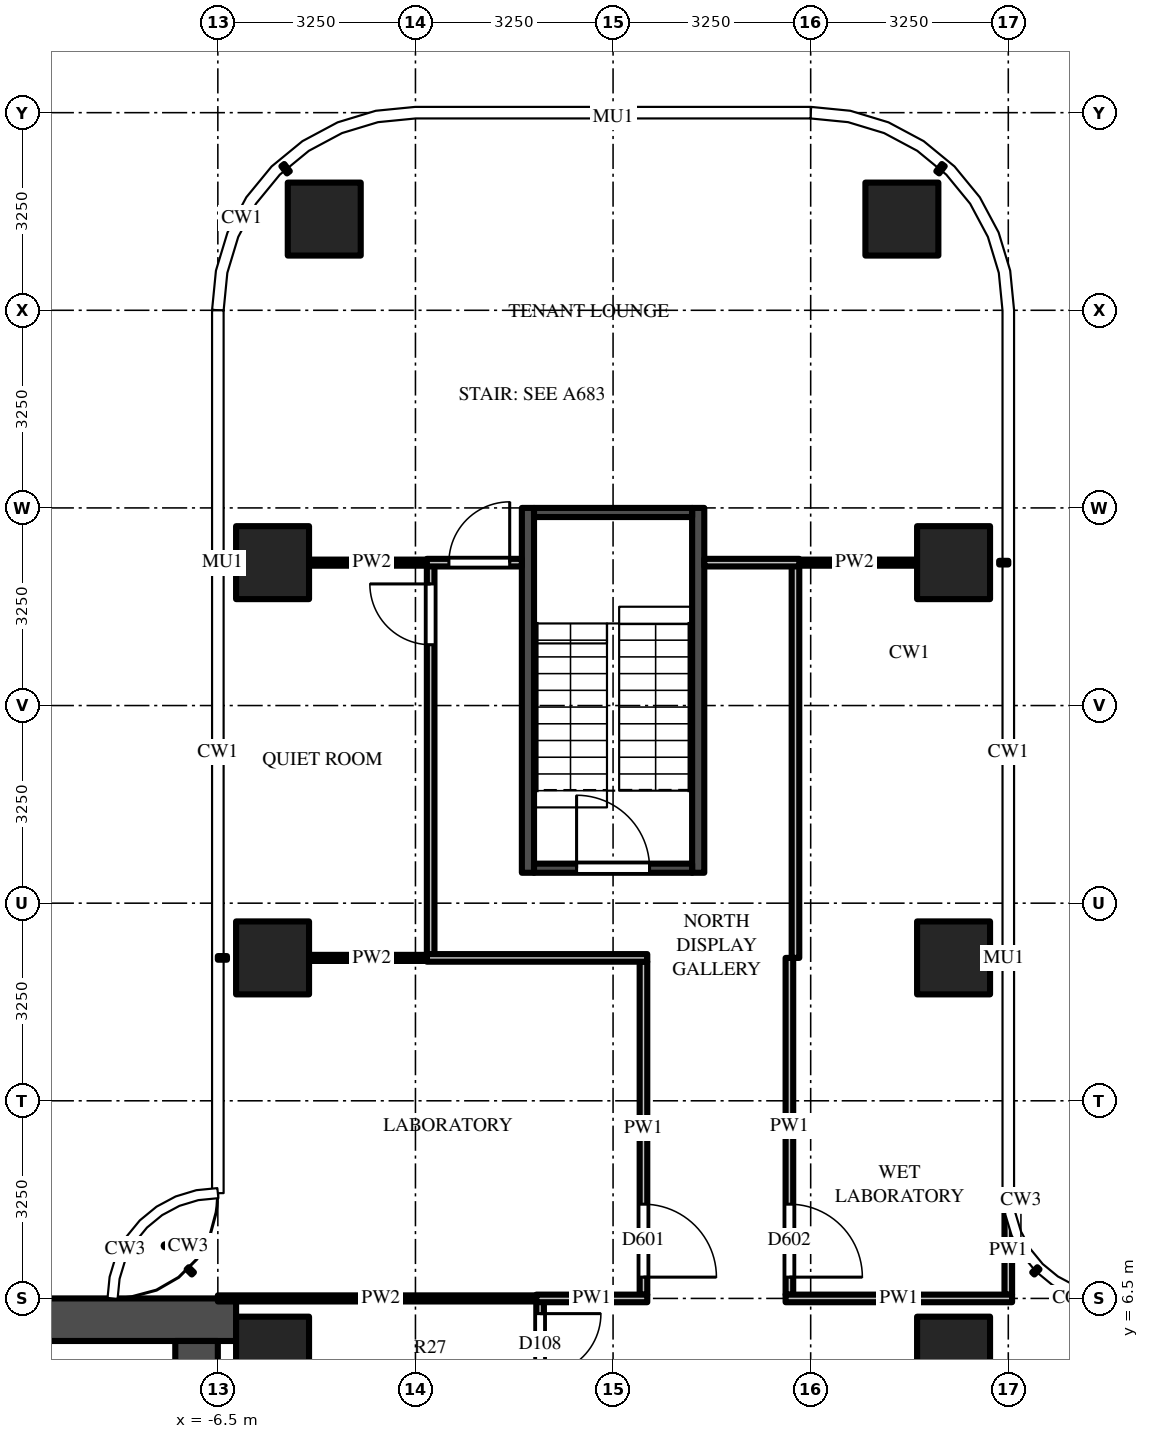
"""IFC4 building model, lengths in metres.
Left out: names, types, materials, properties, quantities, classifications, styles, units other than length and angle.
Written with IfcOpenShell. Run it as: python <this file> out.ifc"""

import sys

from ifc_helpers import new_model, si_unit, direction, frame, frame_2d, origin, origin_2d, place, context, subcontext, project, spatial, rectangle, extrude, source, transform, mapped, element, fill, save


model = new_model("IFC4")
c1 = context("Model", 3, precision=1e-05, world=origin(), true_north=direction((0.0, 1.0)))
c2 = subcontext(c1, "Body", "Model", "MODEL_VIEW")
j1 = project(units=[si_unit("LENGTHUNIT", "METRE"), si_unit("PLANEANGLEUNIT", "RADIAN")], contexts=[c1])
p1 = place(None, origin())
s1 = spatial("IfcSite", under=j1, at=p1, CompositionType="ELEMENT")
p2 = place(p1, origin())
s2 = spatial("IfcBuilding", under=s1, at=p2, CompositionType="ELEMENT")
p3 = place(p2, frame((0.0, 0.0, 162.0)))
s3 = spatial("IfcBuildingStorey", under=s2, at=p3, CompositionType="ELEMENT", Elevation=162.0)
m1 = source(origin(), c2, "Body", "SweptSolid", [
    extrude(rectangle(XDim=1.2, YDim=1.2, at=origin_2d()), origin(), (0.0, 0.0, 1.0), 3.9),
])
for number, where, z_axis, x_axis in (
    (1, (-5.6, 12.1, 0.0), (0.0, 0.0, 1.0), (1.0, 0.0, 0.0)),
    (2, (-5.6, 18.6, 0.0), (0.0, 0.0, 1.0), (1.0, 0.0, 0.0)),
    (3, (-4.75, 24.25, 0.0), (0.0, 0.0, 1.0), (1.0, 0.0, 0.0)),
    (4, (5.6, 12.1, 0.0), (0.0, 0.0, 1.0), (1.0, 0.0, 0.0)),
    (5, (5.6, 18.6, 0.0), (0.0, 0.0, 1.0), (1.0, 0.0, 0.0)),
    (6, (4.75, 24.25, 0.0), (0.0, 0.0, 1.0), (1.0, 0.0, 0.0)),
    (7, (5.6, 5.6, 0.0), (0.0, 0.0, 1.0), (1.0, 0.0, 0.0)),
    (8, (-5.6, 5.6, 0.0), (0.0, 0.0, 1.0), (1.0, 0.0, 0.0)),
):
    element("IfcColumn", number, at=place(p3, frame(where, z_axis=z_axis, x_axis=x_axis)), inside=s3, PredefinedType="COLUMN", context=c2, shape_type="MappedRepresentation", body=[
        mapped(m1, transform((0.0, 0.0, 0.0))),
    ])
m2 = source(origin(), c2, "Body", "SweptSolid", [
    extrude(rectangle(XDim=16.55, YDim=0.7, at=frame_2d((8.275, 0.0))), origin(), (0.0, 0.0, 1.0), 3.7),
])
p4 = place(p3, frame((-6.2, 6.15, 0.0), z_axis=(0.0, 0.0, 1.0), x_axis=(-1.0, 0.0, 0.0)))
e9 = element("IfcWall", 9, at=p4, inside=s3, PredefinedType="SHEAR", context=c2, shape_type="MappedRepresentation", body=[
    mapped(m2, transform((0.0, 0.0, 0.0))),
])
m3 = source(origin(), c2, "Body", "SweptSolid", [
    extrude(rectangle(XDim=9.05, YDim=0.7, at=frame_2d((4.525, 0.0))), origin(), (0.0, 0.0, 1.0), 3.7),
])
p5 = place(p3, frame((-6.85, 5.8, 0.0), z_axis=(0.0, 0.0, 1.0), x_axis=(0.0, -1.0, 0.0)))
e10 = element("IfcWall", 10, at=p5, inside=s3, PredefinedType="SHEAR", context=c2, shape_type="MappedRepresentation", body=[
    mapped(m3, transform((0.0, 0.0, 0.0))),
])
m4 = source(origin(), c2, "Body", "SweptSolid", [
    extrude(rectangle(XDim=1.8, YDim=2.1, at=frame_2d((0.9, 1.05))), frame((0.0, 0.36, 0.0), z_axis=(0.0, -1.0, 0.0), x_axis=(1.0, 0.0, 0.0)), (0.0, 0.0, 1.0), 0.72),
])
p6 = place(p5, frame((3.15, 0.0, 0.0)))
e11 = element("IfcOpeningElement", 11, at=p6, cuts=e10, PredefinedType="OPENING", context=c2, shape_type="MappedRepresentation", body=[
    mapped(m4, transform((0.0, 0.0, 0.0))),
])
m5 = source(origin(), c2, "Body", "SweptSolid", [
    extrude(rectangle(XDim=6.0, YDim=0.2, at=frame_2d((3.0, 0.0))), origin(), (0.0, 0.0, 1.0), 3.7),
])
for number, where, z_axis, x_axis in (
    (12, (-1.4, 13.5, 0.0), (0.0, 0.0, 1.0), (0.0, 1.0, 0.0)),
    (13, (1.4, 13.5, 0.0), (0.0, 0.0, 1.0), (0.0, 1.0, 0.0)),
):
    element("IfcWall", number, at=place(p3, frame(where, z_axis=z_axis, x_axis=x_axis)), inside=s3, PredefinedType="SHEAR", context=c2, shape_type="MappedRepresentation", body=[
        mapped(m5, transform((0.0, 0.0, 0.0))),
    ])
m6 = source(origin(), c2, "Body", "SweptSolid", [
    extrude(rectangle(XDim=2.6, YDim=0.15, at=frame_2d((1.3, 0.0))), origin(), (0.0, 0.0, 1.0), 3.7),
])
p7 = place(p3, frame((-1.3, 13.575, 0.0), z_axis=(0.0, 0.0, 1.0), x_axis=(1.0, 0.0, 0.0)))
e14 = element("IfcWall", 14, at=p7, inside=s3, PredefinedType="SHEAR", context=c2, shape_type="MappedRepresentation", body=[
    mapped(m6, transform((0.0, 0.0, 0.0))),
])
m7 = source(origin(), c2, "Body", "SweptSolid", [
    extrude(rectangle(XDim=1.2, YDim=2.1, at=frame_2d((0.6, 1.05))), frame((0.0, 0.085, 0.0), z_axis=(0.0, -1.0, 0.0), x_axis=(1.0, 0.0, 0.0)), (0.0, 0.0, 1.0), 0.17),
])
p8 = place(p7, frame((0.7, 0.0, 0.0)))
e15 = element("IfcOpeningElement", 15, at=p8, cuts=e14, PredefinedType="OPENING", context=c2, shape_type="MappedRepresentation", body=[
    mapped(m7, transform((0.0, 0.0, 0.0))),
])
p9 = place(p3, frame((-1.3, 19.425, 0.0), z_axis=(0.0, 0.0, 1.0), x_axis=(1.0, 0.0, 0.0)))
e16 = element("IfcWall", 16, at=p9, inside=s3, PredefinedType="SHEAR", context=c2, shape_type="MappedRepresentation", body=[
    mapped(m6, transform((0.0, 0.0, 0.0))),
])
m8 = source(origin(), c2, "Body", "SweptSolid", [
    extrude(rectangle(XDim=6.4, YDim=0.125, at=frame_2d((3.2, 0.0))), origin(), (0.0, 0.0, 1.0), 2.997),
])
p10 = place(p3, frame((-3.0, 12.15, 0.0), z_axis=(0.0, 0.0, 1.0), x_axis=(0.0, 1.0, 0.0)))
e17 = element("IfcWall", 17, at=p10, inside=s3, PredefinedType="PARTITIONING", context=c2, shape_type="MappedRepresentation", body=[
    mapped(m8, transform((0.0, 0.0, 0.0))),
])
m9 = source(origin(), c2, "Body", "SweptSolid", [
    extrude(rectangle(XDim=1.0, YDim=2.1, at=frame_2d((0.5, 1.05))), frame((0.0, 0.073, 0.0), z_axis=(0.0, -1.0, 0.0), x_axis=(1.0, 0.0, 0.0)), (0.0, 0.0, 1.0), 0.145),
])
p11 = place(p10, frame((5.1, 0.0, 0.0)))
e18 = element("IfcOpeningElement", 18, at=p11, cuts=e17, PredefinedType="OPENING", context=c2, shape_type="MappedRepresentation", body=[
    mapped(m9, transform((0.0, 0.0, 0.0))),
])
m10 = source(origin(), c2, "Body", "SweptSolid", [
    extrude(rectangle(XDim=3.137, YDim=0.125, at=frame_2d((1.569, 0.0))), origin(), (0.0, 0.0, 1.0), 2.997),
])
p12 = place(p3, frame((-1.2, 6.45, 0.0), z_axis=(0.0, 0.0, 1.0), x_axis=(0.0, -1.0, 0.0)))
e19 = element("IfcWall", 19, at=p12, inside=s3, PredefinedType="PARTITIONING", context=c2, shape_type="MappedRepresentation", body=[
    mapped(m10, transform((0.0, 0.0, 0.0))),
])
p13 = place(p12, frame((0.2, 0.0, 0.0)))
e20 = element("IfcOpeningElement", 20, at=p13, cuts=e19, PredefinedType="OPENING", context=c2, shape_type="MappedRepresentation", body=[
    mapped(m9, transform((0.0, 0.0, 0.0))),
])
m11 = source(origin(), c2, "Body", "SweptSolid", [
    extrude(rectangle(XDim=5.475, YDim=0.125, at=frame_2d((2.738, 0.0))), origin(), (0.0, 0.0, 1.0), 2.997),
])
p14 = place(p3, frame((0.5, 12.038, 0.0), z_axis=(0.0, 0.0, 1.0), x_axis=(0.0, -1.0, 0.0)))
e21 = element("IfcWall", 21, at=p14, inside=s3, PredefinedType="PARTITIONING", context=c2, shape_type="MappedRepresentation", body=[
    mapped(m11, transform((0.0, 0.0, 0.0))),
])
m12 = source(origin(), c2, "Body", "SweptSolid", [
    extrude(rectangle(XDim=1.2, YDim=2.1, at=frame_2d((0.6, 1.05))), frame((0.0, 0.073, 0.0), z_axis=(0.0, -1.0, 0.0), x_axis=(1.0, 0.0, 0.0)), (0.0, 0.0, 1.0), 0.145),
])
p15 = place(p14, frame((3.988, 0.0, 0.0)))
e22 = element("IfcOpeningElement", 22, at=p15, cuts=e21, PredefinedType="OPENING", context=c2, shape_type="MappedRepresentation", body=[
    mapped(m12, transform((0.0, 0.0, 0.0))),
])
m13 = source(origin(), c2, "Body", "SweptSolid", [
    extrude(rectangle(XDim=5.538, YDim=0.125, at=frame_2d((2.769, 0.0))), origin(), (0.0, 0.0, 1.0), 2.997),
])
p16 = place(p3, frame((2.9, 12.1, 0.0), z_axis=(0.0, 0.0, 1.0), x_axis=(0.0, -1.0, 0.0)))
e23 = element("IfcWall", 23, at=p16, inside=s3, PredefinedType="PARTITIONING", context=c2, shape_type="MappedRepresentation", body=[
    mapped(m13, transform((0.0, 0.0, 0.0))),
])
p17 = place(p16, frame((4.05, 0.0, 0.0)))
e24 = element("IfcOpeningElement", 24, at=p17, cuts=e23, PredefinedType="OPENING", context=c2, shape_type="MappedRepresentation", body=[
    mapped(m12, transform((0.0, 0.0, 0.0))),
])
m14 = source(origin(), c2, "Body", "SweptSolid", [
    extrude(rectangle(XDim=6.45, YDim=0.125, at=frame_2d((3.225, 0.0))), origin(), (0.0, 0.0, 1.0), 2.997),
])
p18 = place(p3, frame((3.0, 18.55, 0.0), z_axis=(0.0, 0.0, 1.0), x_axis=(0.0, -1.0, 0.0)))
e25 = element("IfcWall", 25, at=p18, inside=s3, PredefinedType="PARTITIONING", context=c2, shape_type="MappedRepresentation", body=[
    mapped(m14, transform((0.0, 0.0, 0.0))),
])
m15 = source(origin(), c2, "Body", "SweptSolid", [
    extrude(rectangle(XDim=1.469, YDim=0.125, at=frame_2d((0.734, 0.0))), origin(), (0.0, 0.0, 1.0), 3.7),
])
p19 = place(p3, frame((6.5, 6.562, 0.0), z_axis=(0.0, 0.0, 1.0), x_axis=(0.0, 1.0, 0.0)))
e26 = element("IfcWall", 26, at=p19, inside=s3, PredefinedType="PARTITIONING", context=c2, shape_type="MappedRepresentation", body=[
    mapped(m15, transform((0.0, 0.0, 0.0))),
])
m16 = source(origin(), c2, "Body", "SweptSolid", [
    extrude(rectangle(XDim=5.363, YDim=0.1, at=frame_2d((2.681, 0.0))), origin(), (0.0, 0.0, 1.0), 2.78),
])
p20 = place(p3, frame((-6.5, 6.5, 0.0), z_axis=(0.0, 0.0, 1.0), x_axis=(1.0, 0.0, 0.0)))
e27 = element("IfcWall", 27, at=p20, inside=s3, PredefinedType="PARTITIONING", context=c2, shape_type="MappedRepresentation", body=[
    mapped(m16, transform((0.0, 0.0, 0.0))),
])
m17 = source(origin(), c2, "Body", "SweptSolid", [
    extrude(rectangle(XDim=1.825, YDim=0.125, at=frame_2d((0.913, 0.0))), origin(), (0.0, 0.0, 1.0), 3.7),
])
p21 = place(p3, frame((-1.262, 6.5, 0.0), z_axis=(0.0, 0.0, 1.0), x_axis=(1.0, 0.0, 0.0)))
e28 = element("IfcWall", 28, at=p21, inside=s3, PredefinedType="PARTITIONING", context=c2, shape_type="MappedRepresentation", body=[
    mapped(m17, transform((0.0, 0.0, 0.0))),
])
m18 = source(origin(), c2, "Body", "SweptSolid", [
    extrude(rectangle(XDim=3.725, YDim=0.125, at=frame_2d((1.863, 0.0))), origin(), (0.0, 0.0, 1.0), 2.78),
])
p22 = place(p3, frame((2.837, 6.5, 0.0), z_axis=(0.0, 0.0, 1.0), x_axis=(1.0, 0.0, 0.0)))
e29 = element("IfcWall", 29, at=p22, inside=s3, PredefinedType="PARTITIONING", context=c2, shape_type="MappedRepresentation", body=[
    mapped(m18, transform((0.0, 0.0, 0.0))),
])
m19 = source(origin(), c2, "Body", "SweptSolid", [
    extrude(rectangle(XDim=2.062, YDim=0.1, at=frame_2d((1.031, 0.0))), origin(), (0.0, 0.0, 1.0), 2.997),
])
p23 = place(p3, frame((-5.0, 12.1, 0.0), z_axis=(0.0, 0.0, 1.0), x_axis=(1.0, 0.0, 0.0)))
e30 = element("IfcWall", 30, at=p23, inside=s3, PredefinedType="PARTITIONING", context=c2, shape_type="MappedRepresentation", body=[
    mapped(m19, transform((0.0, 0.0, 0.0))),
])
m20 = source(origin(), c2, "Body", "SweptSolid", [
    extrude(rectangle(XDim=3.625, YDim=0.125, at=frame_2d((1.812, 0.0))), origin(), (0.0, 0.0, 1.0), 2.997),
])
p24 = place(p3, frame((0.562, 12.1, 0.0), z_axis=(0.0, 0.0, 1.0), x_axis=(-1.0, 0.0, 0.0)))
e31 = element("IfcWall", 31, at=p24, inside=s3, PredefinedType="PARTITIONING", context=c2, shape_type="MappedRepresentation", body=[
    mapped(m20, transform((0.0, 0.0, 0.0))),
])
m21 = source(origin(), c2, "Body", "SweptSolid", [
    extrude(rectangle(XDim=2.062, YDim=0.1, at=frame_2d((1.031, 0.0))), origin(), (0.0, 0.0, 1.0), 3.223),
])
for number, where, z_axis, x_axis in (
    (32, (-5.0, 18.6, 0.0), (0.0, 0.0, 1.0), (1.0, 0.0, 0.0)),
    (33, (2.938, 18.6, 0.0), (0.0, 0.0, 1.0), (1.0, 0.0, 0.0)),
):
    element("IfcWall", number, at=place(p3, frame(where, z_axis=z_axis, x_axis=x_axis)), inside=s3, PredefinedType="PARTITIONING", context=c2, shape_type="MappedRepresentation", body=[
        mapped(m21, transform((0.0, 0.0, 0.0))),
    ])
m22 = source(origin(), c2, "Body", "SweptSolid", [
    extrude(rectangle(XDim=1.562, YDim=0.125, at=frame_2d((0.781, 0.0))), origin(), (0.0, 0.0, 1.0), 3.223),
])
p25 = place(p3, frame((-3.062, 18.6, 0.0), z_axis=(0.0, 0.0, 1.0), x_axis=(1.0, 0.0, 0.0)))
e34 = element("IfcWall", 34, at=p25, inside=s3, PredefinedType="PARTITIONING", context=c2, shape_type="MappedRepresentation", body=[
    mapped(m22, transform((0.0, 0.0, 0.0))),
])
p26 = place(p25, frame((0.363, 0.0, 0.0)))
e35 = element("IfcOpeningElement", 35, at=p26, cuts=e34, PredefinedType="OPENING", context=c2, shape_type="MappedRepresentation", body=[
    mapped(m9, transform((0.0, 0.0, 0.0))),
])
p27 = place(p3, frame((1.5, 18.6, 0.0), z_axis=(0.0, 0.0, 1.0), x_axis=(1.0, 0.0, 0.0)))
e36 = element("IfcWall", 36, at=p27, inside=s3, PredefinedType="PARTITIONING", context=c2, shape_type="MappedRepresentation", body=[
    mapped(m22, transform((0.0, 0.0, 0.0))),
])
m23 = source(origin(), c2, "Body", "SweptSolid", [
    extrude(rectangle(XDim=1.2, YDim=2.1, at=frame_2d((0.6, 1.05))), frame((0.0, 0.025, 0.0), z_axis=(0.0, -1.0, 0.0), x_axis=(1.0, 0.0, 0.0)), (0.0, 0.0, 1.0), 0.05),
])
p28 = place(p8, origin())
e37 = element("IfcDoor", 37, at=p28, inside=s3, OperationType="SINGLE_SWING_LEFT", PredefinedType="DOOR", context=c2, shape_type="MappedRepresentation", body=[
    mapped(m23, transform((0.0, 0.0, 0.0))),
])
fill(e15, e37)
m24 = source(origin(), c2, "Body", "SweptSolid", [
    extrude(rectangle(XDim=1.0, YDim=2.1, at=frame_2d((0.5, 1.05))), frame((0.0, 0.025, 0.0), z_axis=(0.0, -1.0, 0.0), x_axis=(1.0, 0.0, 0.0)), (0.0, 0.0, 1.0), 0.05),
])
p29 = place(p13, origin())
e38 = element("IfcDoor", 38, at=p29, inside=s3, OperationType="SINGLE_SWING_LEFT", PredefinedType="DOOR", context=c2, shape_type="MappedRepresentation", body=[
    mapped(m24, transform((0.0, 0.0, 0.0))),
])
fill(e20, e38)
p30 = place(p15, origin())
e39 = element("IfcDoor", 39, at=p30, inside=s3, OperationType="SINGLE_SWING_RIGHT", PredefinedType="DOOR", context=c2, shape_type="MappedRepresentation", body=[
    mapped(m23, transform((0.0, 0.0, 0.0))),
])
fill(e22, e39)
p31 = place(p17, origin())
e40 = element("IfcDoor", 40, at=p31, inside=s3, OperationType="SINGLE_SWING_RIGHT", PredefinedType="DOOR", context=c2, shape_type="MappedRepresentation", body=[
    mapped(m23, transform((0.0, 0.0, 0.0))),
])
fill(e24, e40)
p32 = place(p11, origin())
e41 = element("IfcDoor", 41, at=p32, inside=s3, OperationType="SINGLE_SWING_RIGHT", PredefinedType="DOOR", context=c2, shape_type="MappedRepresentation", body=[
    mapped(m24, transform((0.0, 0.0, 0.0))),
])
fill(e18, e41)
p33 = place(p26, origin())
e42 = element("IfcDoor", 42, at=p33, inside=s3, OperationType="SINGLE_SWING_RIGHT", PredefinedType="DOOR", context=c2, shape_type="MappedRepresentation", body=[
    mapped(m24, transform((0.0, 0.0, 0.0))),
])
fill(e35, e42)
save(model, sys.argv[1])
